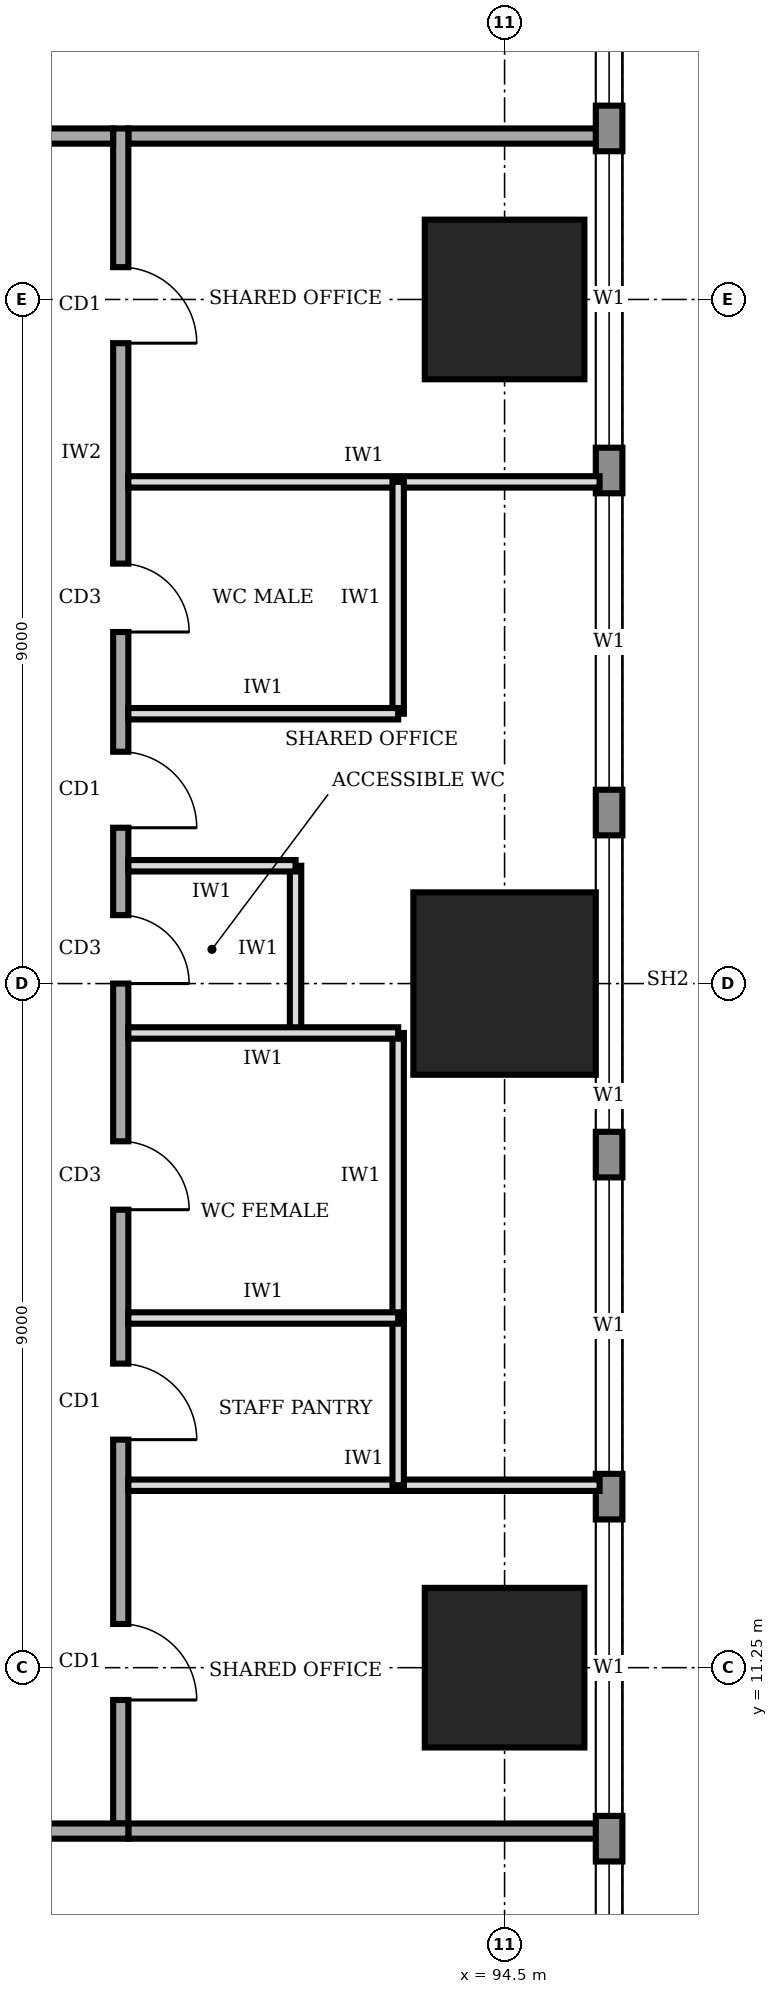
"""IFC4 building model, lengths in metres.
Left out: names, types, materials, properties, quantities, classifications, styles, units other than length and angle.
Written with IfcOpenShell. Run it as: python <this file> out.ifc"""

import sys

from ifc_helpers import new_model, si_unit, direction, frame, frame_2d, origin, origin_2d, place, context, subcontext, project, spatial, rectangle, extrude, element, fill, save


model = new_model("IFC4")
c1 = context("Model", 3, precision=1e-05, world=origin(), true_north=direction((0.0, 1.0)))
c2 = subcontext(c1, "Body", "Model", "MODEL_VIEW")
j1 = project(units=[si_unit("LENGTHUNIT", "METRE"), si_unit("PLANEANGLEUNIT", "RADIAN")], contexts=[c1])
p1 = place(None, origin())
s1 = spatial("IfcSite", under=j1, at=p1, CompositionType="ELEMENT")
p2 = place(p1, origin())
s2 = spatial("IfcBuilding", under=s1, at=p2, CompositionType="ELEMENT")
p3 = place(p2, frame((0.0, 0.0, 117.0)))
s3 = spatial("IfcBuildingStorey", under=s2, at=p3, CompositionType="ELEMENT", Elevation=117.0)
p4 = place(p3, frame((94.5, 11.25, 0.0), z_axis=(0.0, 0.0, 1.0), x_axis=(1.0, 0.0, 0.0)))
e1 = element("IfcColumn", 1, at=p4, inside=s3, PredefinedType="COLUMN", context=c2, shape_type="SweptSolid", body=[
    extrude(rectangle(XDim=2.1, YDim=2.1, at=origin_2d()), origin(), (0.0, 0.0, 1.0), 4.0),
])
p5 = place(p3, frame((94.5, 20.25, 0.0), z_axis=(0.0, 0.0, 1.0), x_axis=(1.0, 0.0, 0.0)))
e2 = element("IfcColumn", 2, at=p5, inside=s3, PredefinedType="COLUMN", context=c2, shape_type="SweptSolid", body=[
    extrude(rectangle(XDim=2.4, YDim=2.4, at=origin_2d()), origin(), (0.0, 0.0, 1.0), 4.0),
])
p6 = place(p3, frame((94.5, 29.25, 0.0), z_axis=(0.0, 0.0, 1.0), x_axis=(1.0, 0.0, 0.0)))
e3 = element("IfcColumn", 3, at=p6, inside=s3, PredefinedType="COLUMN", context=c2, shape_type="SweptSolid", body=[
    extrude(rectangle(XDim=2.1, YDim=2.1, at=origin_2d()), origin(), (0.0, 0.0, 1.0), 4.0),
])
p7 = place(p3, frame((95.875, 3.32, 0.0), z_axis=(0.0, 0.0, 1.0), x_axis=(0.0, 1.0, 0.0)))
e4 = element("IfcWall", 4, at=p7, inside=s3, PredefinedType="STANDARD", context=c2, shape_type="SweptSolid", body=[
    extrude(rectangle(XDim=33.96, YDim=0.35, at=frame_2d((16.98, 0.0))), origin(), (0.0, 0.0, 1.0), 3.75),
])
p8 = place(p7, frame((1.48, 0.0, 0.9)))
e5 = element("IfcOpeningElement", 5, at=p8, cuts=e4, PredefinedType="OPENING", context=c2, shape_type="SweptSolid", body=[
    extrude(rectangle(XDim=3.9, YDim=2.2, at=frame_2d((1.95, 1.1))), frame((0.0, 0.185, 0.0), z_axis=(0.0, -1.0, 0.0), x_axis=(1.0, 0.0, 0.0)), (0.0, 0.0, 1.0), 0.37),
])
p9 = place(p7, frame((5.98, 0.0, 0.9)))
e6 = element("IfcOpeningElement", 6, at=p9, cuts=e4, PredefinedType="OPENING", context=c2, shape_type="SweptSolid", body=[
    extrude(rectangle(XDim=3.9, YDim=2.2, at=frame_2d((1.95, 1.1))), frame((0.0, 0.185, 0.0), z_axis=(0.0, -1.0, 0.0), x_axis=(1.0, 0.0, 0.0)), (0.0, 0.0, 1.0), 0.37),
])
p10 = place(p7, frame((10.48, 0.0, 0.9)))
e7 = element("IfcOpeningElement", 7, at=p10, cuts=e4, PredefinedType="OPENING", context=c2, shape_type="SweptSolid", body=[
    extrude(rectangle(XDim=3.9, YDim=2.2, at=frame_2d((1.95, 1.1))), frame((0.0, 0.185, 0.0), z_axis=(0.0, -1.0, 0.0), x_axis=(1.0, 0.0, 0.0)), (0.0, 0.0, 1.0), 0.37),
])
p11 = place(p7, frame((14.98, 0.0, 0.9)))
e8 = element("IfcOpeningElement", 8, at=p11, cuts=e4, PredefinedType="OPENING", context=c2, shape_type="SweptSolid", body=[
    extrude(rectangle(XDim=3.9, YDim=2.2, at=frame_2d((1.95, 1.1))), frame((0.0, 0.185, 0.0), z_axis=(0.0, -1.0, 0.0), x_axis=(1.0, 0.0, 0.0)), (0.0, 0.0, 1.0), 0.37),
])
p12 = place(p7, frame((19.48, 0.0, 0.9)))
e9 = element("IfcOpeningElement", 9, at=p12, cuts=e4, PredefinedType="OPENING", context=c2, shape_type="SweptSolid", body=[
    extrude(rectangle(XDim=3.9, YDim=2.2, at=frame_2d((1.95, 1.1))), frame((0.0, 0.185, 0.0), z_axis=(0.0, -1.0, 0.0), x_axis=(1.0, 0.0, 0.0)), (0.0, 0.0, 1.0), 0.37),
])
p13 = place(p7, frame((23.98, 0.0, 0.9)))
e10 = element("IfcOpeningElement", 10, at=p13, cuts=e4, PredefinedType="OPENING", context=c2, shape_type="SweptSolid", body=[
    extrude(rectangle(XDim=3.9, YDim=2.2, at=frame_2d((1.95, 1.1))), frame((0.0, 0.185, 0.0), z_axis=(0.0, -1.0, 0.0), x_axis=(1.0, 0.0, 0.0)), (0.0, 0.0, 1.0), 0.37),
])
p14 = place(p7, frame((28.48, 0.0, 0.9)))
e11 = element("IfcOpeningElement", 11, at=p14, cuts=e4, PredefinedType="OPENING", context=c2, shape_type="SweptSolid", body=[
    extrude(rectangle(XDim=3.9, YDim=2.2, at=frame_2d((1.95, 1.1))), frame((0.0, 0.185, 0.0), z_axis=(0.0, -1.0, 0.0), x_axis=(1.0, 0.0, 0.0)), (0.0, 0.0, 1.0), 0.37),
])
p15 = place(p3, frame((71.15, 9.1, 0.0), z_axis=(0.0, 0.0, 1.0), x_axis=(1.0, 0.0, 0.0)))
e12 = element("IfcWall", 12, at=p15, inside=s3, PredefinedType="SOLIDWALL", context=c2, shape_type="SweptSolid", body=[
    extrude(rectangle(XDim=18.4, YDim=0.2, at=frame_2d((9.2, 0.0))), origin(), (0.0, 0.0, 1.0), 3.75),
])
p16 = place(p15, frame((2.075, 0.0, 0.0)))
e13 = element("IfcOpeningElement", 13, at=p16, cuts=e12, PredefinedType="OPENING", context=c2, shape_type="SweptSolid", body=[
    extrude(rectangle(XDim=1.0, YDim=2.1, at=frame_2d((0.5, 1.05))), frame((0.0, 0.11, 0.0), z_axis=(0.0, -1.0, 0.0), x_axis=(1.0, 0.0, 0.0)), (0.0, 0.0, 1.0), 0.22),
])
p17 = place(p15, frame((9.35, 0.0, 0.0)))
e14 = element("IfcOpeningElement", 14, at=p17, cuts=e12, PredefinedType="OPENING", context=c2, shape_type="SweptSolid", body=[
    extrude(rectangle(XDim=1.0, YDim=2.1, at=frame_2d((0.5, 1.05))), frame((0.0, 0.11, 0.0), z_axis=(0.0, -1.0, 0.0), x_axis=(1.0, 0.0, 0.0)), (0.0, 0.0, 1.0), 0.22),
])
p18 = place(p15, frame((15.875, 0.0, 0.0)))
e15 = element("IfcOpeningElement", 15, at=p18, cuts=e12, PredefinedType="OPENING", context=c2, shape_type="SweptSolid", body=[
    extrude(rectangle(XDim=1.0, YDim=2.1, at=frame_2d((0.5, 1.05))), frame((0.0, 0.11, 0.0), z_axis=(0.0, -1.0, 0.0), x_axis=(1.0, 0.0, 0.0)), (0.0, 0.0, 1.0), 0.22),
])
p19 = place(p3, frame((89.45, 9.2, 0.0), z_axis=(0.0, 0.0, 1.0), x_axis=(0.0, 1.0, 0.0)))
e16 = element("IfcWall", 16, at=p19, inside=s3, PredefinedType="SOLIDWALL", context=c2, shape_type="SweptSolid", body=[
    extrude(rectangle(XDim=22.3, YDim=0.2, at=frame_2d((11.15, 0.0))), origin(), (0.0, 0.0, 1.0), 3.75),
])
p20 = place(p19, frame((1.625, 0.0, 0.0)))
e17 = element("IfcOpeningElement", 17, at=p20, cuts=e16, PredefinedType="OPENING", context=c2, shape_type="SweptSolid", body=[
    extrude(rectangle(XDim=1.0, YDim=2.1, at=frame_2d((0.5, 1.05))), frame((0.0, 0.11, 0.0), z_axis=(0.0, -1.0, 0.0), x_axis=(1.0, 0.0, 0.0)), (0.0, 0.0, 1.0), 0.22),
])
p21 = place(p19, frame((5.05, 0.0, 0.0)))
e18 = element("IfcOpeningElement", 18, at=p21, cuts=e16, PredefinedType="OPENING", context=c2, shape_type="SweptSolid", body=[
    extrude(rectangle(XDim=1.0, YDim=2.1, at=frame_2d((0.5, 1.05))), frame((0.0, 0.11, 0.0), z_axis=(0.0, -1.0, 0.0), x_axis=(1.0, 0.0, 0.0)), (0.0, 0.0, 1.0), 0.22),
])
p22 = place(p19, frame((8.075, 0.0, 0.0)))
e19 = element("IfcOpeningElement", 19, at=p22, cuts=e16, PredefinedType="OPENING", context=c2, shape_type="SweptSolid", body=[
    extrude(rectangle(XDim=0.9, YDim=2.1, at=frame_2d((0.45, 1.05))), frame((0.0, 0.11, 0.0), z_axis=(0.0, -1.0, 0.0), x_axis=(1.0, 0.0, 0.0)), (0.0, 0.0, 1.0), 0.22),
])
p23 = place(p19, frame((11.05, 0.0, 0.0)))
e20 = element("IfcOpeningElement", 20, at=p23, cuts=e16, PredefinedType="OPENING", context=c2, shape_type="SweptSolid", body=[
    extrude(rectangle(XDim=0.9, YDim=2.1, at=frame_2d((0.45, 1.05))), frame((0.0, 0.11, 0.0), z_axis=(0.0, -1.0, 0.0), x_axis=(1.0, 0.0, 0.0)), (0.0, 0.0, 1.0), 0.22),
])
p24 = place(p19, frame((15.675, 0.0, 0.0)))
e21 = element("IfcOpeningElement", 21, at=p24, cuts=e16, PredefinedType="OPENING", context=c2, shape_type="SweptSolid", body=[
    extrude(rectangle(XDim=0.9, YDim=2.1, at=frame_2d((0.45, 1.05))), frame((0.0, 0.11, 0.0), z_axis=(0.0, -1.0, 0.0), x_axis=(1.0, 0.0, 0.0)), (0.0, 0.0, 1.0), 0.22),
])
p25 = place(p19, frame((13.1, 0.0, 0.0)))
e22 = element("IfcOpeningElement", 22, at=p25, cuts=e16, PredefinedType="OPENING", context=c2, shape_type="SweptSolid", body=[
    extrude(rectangle(XDim=1.0, YDim=2.1, at=frame_2d((0.5, 1.05))), frame((0.0, 0.11, 0.0), z_axis=(0.0, -1.0, 0.0), x_axis=(1.0, 0.0, 0.0)), (0.0, 0.0, 1.0), 0.22),
])
p26 = place(p19, frame((19.475, 0.0, 0.0)))
e23 = element("IfcOpeningElement", 23, at=p26, cuts=e16, PredefinedType="OPENING", context=c2, shape_type="SweptSolid", body=[
    extrude(rectangle(XDim=1.0, YDim=2.1, at=frame_2d((0.5, 1.05))), frame((0.0, 0.11, 0.0), z_axis=(0.0, -1.0, 0.0), x_axis=(1.0, 0.0, 0.0)), (0.0, 0.0, 1.0), 0.22),
])
p27 = place(p3, frame((89.35, 31.4, 0.0), z_axis=(0.0, 0.0, 1.0), x_axis=(-1.0, 0.0, 0.0)))
e24 = element("IfcWall", 24, at=p27, inside=s3, PredefinedType="SOLIDWALL", context=c2, shape_type="SweptSolid", body=[
    extrude(rectangle(XDim=18.4, YDim=0.2, at=frame_2d((9.2, 0.0))), origin(), (0.0, 0.0, 1.0), 3.75),
])
p28 = place(p27, frame((14.725, 0.0, 0.0)))
e25 = element("IfcOpeningElement", 25, at=p28, cuts=e24, PredefinedType="OPENING", context=c2, shape_type="SweptSolid", body=[
    extrude(rectangle(XDim=1.8, YDim=2.1, at=frame_2d((0.9, 1.05))), frame((0.0, 0.11, 0.0), z_axis=(0.0, -1.0, 0.0), x_axis=(1.0, 0.0, 0.0)), (0.0, 0.0, 1.0), 0.22),
])
p29 = place(p27, frame((7.85, 0.0, 0.0)))
e26 = element("IfcOpeningElement", 26, at=p29, cuts=e24, PredefinedType="OPENING", context=c2, shape_type="SweptSolid", body=[
    extrude(rectangle(XDim=1.0, YDim=2.1, at=frame_2d((0.5, 1.05))), frame((0.0, 0.11, 0.0), z_axis=(0.0, -1.0, 0.0), x_axis=(1.0, 0.0, 0.0)), (0.0, 0.0, 1.0), 0.22),
])
p30 = place(p27, frame((1.325, 0.0, 0.0)))
e27 = element("IfcOpeningElement", 27, at=p30, cuts=e24, PredefinedType="OPENING", context=c2, shape_type="SweptSolid", body=[
    extrude(rectangle(XDim=1.0, YDim=2.1, at=frame_2d((0.5, 1.05))), frame((0.0, 0.11, 0.0), z_axis=(0.0, -1.0, 0.0), x_axis=(1.0, 0.0, 0.0)), (0.0, 0.0, 1.0), 0.22),
])
for number, where, z_axis, x_axis in (
    (28, (89.55, 9.1, 0.0), (0.0, 0.0, 1.0), (1.0, 0.0, 0.0)),
    (29, (89.55, 31.4, 0.0), (0.0, 0.0, 1.0), (1.0, 0.0, 0.0)),
):
    element("IfcWall", number, at=place(p3, frame(where, z_axis=z_axis, x_axis=x_axis)), inside=s3, PredefinedType="SOLIDWALL", context=c2, shape_type="SweptSolid", body=[
        extrude(rectangle(XDim=6.2, YDim=0.2, at=frame_2d((3.1, 0.0))), origin(), (0.0, 0.0, 1.0), 3.75),
    ])
for number, where, z_axis, x_axis in (
    (30, (89.55, 13.65, 0.0), (0.0, 0.0, 1.0), (1.0, 0.0, 0.0)),
    (31, (89.55, 26.85, 0.0), (0.0, 0.0, 1.0), (1.0, 0.0, 0.0)),
):
    element("IfcWall", number, at=place(p3, frame(where, z_axis=z_axis, x_axis=x_axis)), inside=s3, PredefinedType="PARTITIONING", context=c2, shape_type="SweptSolid", body=[
        extrude(rectangle(XDim=6.2, YDim=0.15, at=frame_2d((3.1, 0.0))), origin(), (0.0, 0.0, 1.0), 3.75),
    ])
p31 = place(p3, frame((89.55, 15.85, 0.0), z_axis=(0.0, 0.0, 1.0), x_axis=(1.0, 0.0, 0.0)))
e32 = element("IfcWall", 32, at=p31, inside=s3, PredefinedType="PARTITIONING", context=c2, shape_type="SweptSolid", body=[
    extrude(rectangle(XDim=3.55, YDim=0.15, at=frame_2d((1.775, 0.0))), origin(), (0.0, 0.0, 1.0), 3.75),
])
p32 = place(p3, frame((89.55, 19.6, 0.0), z_axis=(0.0, 0.0, 1.0), x_axis=(1.0, 0.0, 0.0)))
e33 = element("IfcWall", 33, at=p32, inside=s3, PredefinedType="PARTITIONING", context=c2, shape_type="SweptSolid", body=[
    extrude(rectangle(XDim=3.55, YDim=0.15, at=frame_2d((1.775, 0.0))), origin(), (0.0, 0.0, 1.0), 2.85),
])
p33 = place(p3, frame((89.55, 21.8, 0.0), z_axis=(0.0, 0.0, 1.0), x_axis=(1.0, 0.0, 0.0)))
e34 = element("IfcWall", 34, at=p33, inside=s3, PredefinedType="PARTITIONING", context=c2, shape_type="SweptSolid", body=[
    extrude(rectangle(XDim=2.2, YDim=0.15, at=frame_2d((1.1, 0.0))), origin(), (0.0, 0.0, 1.0), 3.75),
])
p34 = place(p3, frame((89.55, 23.8, 0.0), z_axis=(0.0, 0.0, 1.0), x_axis=(1.0, 0.0, 0.0)))
e35 = element("IfcWall", 35, at=p34, inside=s3, PredefinedType="PARTITIONING", context=c2, shape_type="SweptSolid", body=[
    extrude(rectangle(XDim=3.55, YDim=0.15, at=frame_2d((1.775, 0.0))), origin(), (0.0, 0.0, 1.0), 3.75),
])
p35 = place(p3, frame((93.1, 13.65, 0.0), z_axis=(0.0, 0.0, 1.0), x_axis=(0.0, 1.0, 0.0)))
e36 = element("IfcWall", 36, at=p35, inside=s3, PredefinedType="PARTITIONING", context=c2, shape_type="SweptSolid", body=[
    extrude(rectangle(XDim=2.2, YDim=0.15, at=frame_2d((1.1, 0.0))), origin(), (0.0, 0.0, 1.0), 3.75),
])
p36 = place(p3, frame((93.1, 15.85, 0.0), z_axis=(0.0, 0.0, 1.0), x_axis=(0.0, 1.0, 0.0)))
e37 = element("IfcWall", 37, at=p36, inside=s3, PredefinedType="PARTITIONING", context=c2, shape_type="SweptSolid", body=[
    extrude(rectangle(XDim=3.75, YDim=0.15, at=frame_2d((1.875, 0.0))), origin(), (0.0, 0.0, 1.0), 3.75),
])
p37 = place(p3, frame((91.75, 19.6, 0.0), z_axis=(0.0, 0.0, 1.0), x_axis=(0.0, 1.0, 0.0)))
e38 = element("IfcWall", 38, at=p37, inside=s3, PredefinedType="PARTITIONING", context=c2, shape_type="SweptSolid", body=[
    extrude(rectangle(XDim=2.2, YDim=0.15, at=frame_2d((1.1, 0.0))), origin(), (0.0, 0.0, 1.0), 3.75),
])
p38 = place(p3, frame((93.1, 23.8, 0.0), z_axis=(0.0, 0.0, 1.0), x_axis=(0.0, 1.0, 0.0)))
e39 = element("IfcWall", 39, at=p38, inside=s3, PredefinedType="PARTITIONING", context=c2, shape_type="SweptSolid", body=[
    extrude(rectangle(XDim=3.05, YDim=0.15, at=frame_2d((1.525, 0.0))), origin(), (0.0, 0.0, 1.0), 3.75),
])
p39 = place(p8, origin())
e40 = element("IfcWindow", 40, at=p39, inside=s3, PartitioningType="SINGLE_PANEL", PredefinedType="WINDOW", context=c2, shape_type="SweptSolid", body=[
    extrude(rectangle(XDim=3.9, YDim=2.2, at=frame_2d((1.95, 1.1))), frame((0.0, 0.03, 0.0), z_axis=(0.0, -1.0, 0.0), x_axis=(1.0, 0.0, 0.0)), (0.0, 0.0, 1.0), 0.06),
])
fill(e5, e40)
p40 = place(p9, origin())
e41 = element("IfcWindow", 41, at=p40, inside=s3, PartitioningType="SINGLE_PANEL", PredefinedType="WINDOW", context=c2, shape_type="SweptSolid", body=[
    extrude(rectangle(XDim=3.9, YDim=2.2, at=frame_2d((1.95, 1.1))), frame((0.0, 0.03, 0.0), z_axis=(0.0, -1.0, 0.0), x_axis=(1.0, 0.0, 0.0)), (0.0, 0.0, 1.0), 0.06),
])
fill(e6, e41)
p41 = place(p10, origin())
e42 = element("IfcWindow", 42, at=p41, inside=s3, PartitioningType="SINGLE_PANEL", PredefinedType="WINDOW", context=c2, shape_type="SweptSolid", body=[
    extrude(rectangle(XDim=3.9, YDim=2.2, at=frame_2d((1.95, 1.1))), frame((0.0, 0.03, 0.0), z_axis=(0.0, -1.0, 0.0), x_axis=(1.0, 0.0, 0.0)), (0.0, 0.0, 1.0), 0.06),
])
fill(e7, e42)
p42 = place(p11, origin())
e43 = element("IfcWindow", 43, at=p42, inside=s3, PartitioningType="SINGLE_PANEL", PredefinedType="WINDOW", context=c2, shape_type="SweptSolid", body=[
    extrude(rectangle(XDim=3.9, YDim=2.2, at=frame_2d((1.95, 1.1))), frame((0.0, 0.03, 0.0), z_axis=(0.0, -1.0, 0.0), x_axis=(1.0, 0.0, 0.0)), (0.0, 0.0, 1.0), 0.06),
])
fill(e8, e43)
p43 = place(p12, origin())
e44 = element("IfcWindow", 44, at=p43, inside=s3, PartitioningType="SINGLE_PANEL", PredefinedType="WINDOW", context=c2, shape_type="SweptSolid", body=[
    extrude(rectangle(XDim=3.9, YDim=2.2, at=frame_2d((1.95, 1.1))), frame((0.0, 0.03, 0.0), z_axis=(0.0, -1.0, 0.0), x_axis=(1.0, 0.0, 0.0)), (0.0, 0.0, 1.0), 0.06),
])
fill(e9, e44)
p44 = place(p13, origin())
e45 = element("IfcWindow", 45, at=p44, inside=s3, PartitioningType="SINGLE_PANEL", PredefinedType="WINDOW", context=c2, shape_type="SweptSolid", body=[
    extrude(rectangle(XDim=3.9, YDim=2.2, at=frame_2d((1.95, 1.1))), frame((0.0, 0.03, 0.0), z_axis=(0.0, -1.0, 0.0), x_axis=(1.0, 0.0, 0.0)), (0.0, 0.0, 1.0), 0.06),
])
fill(e10, e45)
p45 = place(p14, origin())
e46 = element("IfcWindow", 46, at=p45, inside=s3, PartitioningType="SINGLE_PANEL", PredefinedType="WINDOW", context=c2, shape_type="SweptSolid", body=[
    extrude(rectangle(XDim=3.9, YDim=2.2, at=frame_2d((1.95, 1.1))), frame((0.0, 0.03, 0.0), z_axis=(0.0, -1.0, 0.0), x_axis=(1.0, 0.0, 0.0)), (0.0, 0.0, 1.0), 0.06),
])
fill(e11, e46)
p46 = place(p20, frame((1.0, 0.0, 0.0), z_axis=(0.0, 0.0, 1.0), x_axis=(-1.0, 0.0, 0.0)))
e47 = element("IfcDoor", 47, at=p46, inside=s3, OperationType="SINGLE_SWING_RIGHT", PredefinedType="DOOR", context=c2, shape_type="SweptSolid", body=[
    extrude(rectangle(XDim=1.0, YDim=2.1, at=frame_2d((0.5, 1.05))), frame((0.0, 0.025, 0.0), z_axis=(0.0, -1.0, 0.0), x_axis=(1.0, 0.0, 0.0)), (0.0, 0.0, 1.0), 0.05),
])
fill(e17, e47)
p47 = place(p21, frame((1.0, 0.0, 0.0), z_axis=(0.0, 0.0, 1.0), x_axis=(-1.0, 0.0, 0.0)))
e48 = element("IfcDoor", 48, at=p47, inside=s3, OperationType="SINGLE_SWING_RIGHT", PredefinedType="DOOR", context=c2, shape_type="SweptSolid", body=[
    extrude(rectangle(XDim=1.0, YDim=2.1, at=frame_2d((0.5, 1.05))), frame((0.0, 0.025, 0.0), z_axis=(0.0, -1.0, 0.0), x_axis=(1.0, 0.0, 0.0)), (0.0, 0.0, 1.0), 0.05),
])
fill(e18, e48)
p48 = place(p22, frame((0.9, 0.0, 0.0), z_axis=(0.0, 0.0, 1.0), x_axis=(-1.0, 0.0, 0.0)))
e49 = element("IfcDoor", 49, at=p48, inside=s3, OperationType="SINGLE_SWING_RIGHT", PredefinedType="DOOR", context=c2, shape_type="SweptSolid", body=[
    extrude(rectangle(XDim=0.9, YDim=2.1, at=frame_2d((0.45, 1.05))), frame((0.0, 0.025, 0.0), z_axis=(0.0, -1.0, 0.0), x_axis=(1.0, 0.0, 0.0)), (0.0, 0.0, 1.0), 0.05),
])
fill(e19, e49)
p49 = place(p23, frame((0.9, 0.0, 0.0), z_axis=(0.0, 0.0, 1.0), x_axis=(-1.0, 0.0, 0.0)))
e50 = element("IfcDoor", 50, at=p49, inside=s3, OperationType="SINGLE_SWING_RIGHT", PredefinedType="DOOR", context=c2, shape_type="SweptSolid", body=[
    extrude(rectangle(XDim=0.9, YDim=2.1, at=frame_2d((0.45, 1.05))), frame((0.0, 0.025, 0.0), z_axis=(0.0, -1.0, 0.0), x_axis=(1.0, 0.0, 0.0)), (0.0, 0.0, 1.0), 0.05),
])
fill(e20, e50)
p50 = place(p24, frame((0.9, 0.0, 0.0), z_axis=(0.0, 0.0, 1.0), x_axis=(-1.0, 0.0, 0.0)))
e51 = element("IfcDoor", 51, at=p50, inside=s3, OperationType="SINGLE_SWING_RIGHT", PredefinedType="DOOR", context=c2, shape_type="SweptSolid", body=[
    extrude(rectangle(XDim=0.9, YDim=2.1, at=frame_2d((0.45, 1.05))), frame((0.0, 0.025, 0.0), z_axis=(0.0, -1.0, 0.0), x_axis=(1.0, 0.0, 0.0)), (0.0, 0.0, 1.0), 0.05),
])
fill(e21, e51)
p51 = place(p25, frame((1.0, 0.0, 0.0), z_axis=(0.0, 0.0, 1.0), x_axis=(-1.0, 0.0, 0.0)))
e52 = element("IfcDoor", 52, at=p51, inside=s3, OperationType="SINGLE_SWING_RIGHT", PredefinedType="DOOR", context=c2, shape_type="SweptSolid", body=[
    extrude(rectangle(XDim=1.0, YDim=2.1, at=frame_2d((0.5, 1.05))), frame((0.0, 0.025, 0.0), z_axis=(0.0, -1.0, 0.0), x_axis=(1.0, 0.0, 0.0)), (0.0, 0.0, 1.0), 0.05),
])
fill(e22, e52)
p52 = place(p26, frame((1.0, 0.0, 0.0), z_axis=(0.0, 0.0, 1.0), x_axis=(-1.0, 0.0, 0.0)))
e53 = element("IfcDoor", 53, at=p52, inside=s3, OperationType="SINGLE_SWING_RIGHT", PredefinedType="DOOR", context=c2, shape_type="SweptSolid", body=[
    extrude(rectangle(XDim=1.0, YDim=2.1, at=frame_2d((0.5, 1.05))), frame((0.0, 0.025, 0.0), z_axis=(0.0, -1.0, 0.0), x_axis=(1.0, 0.0, 0.0)), (0.0, 0.0, 1.0), 0.05),
])
fill(e23, e53)
save(model, sys.argv[1])
